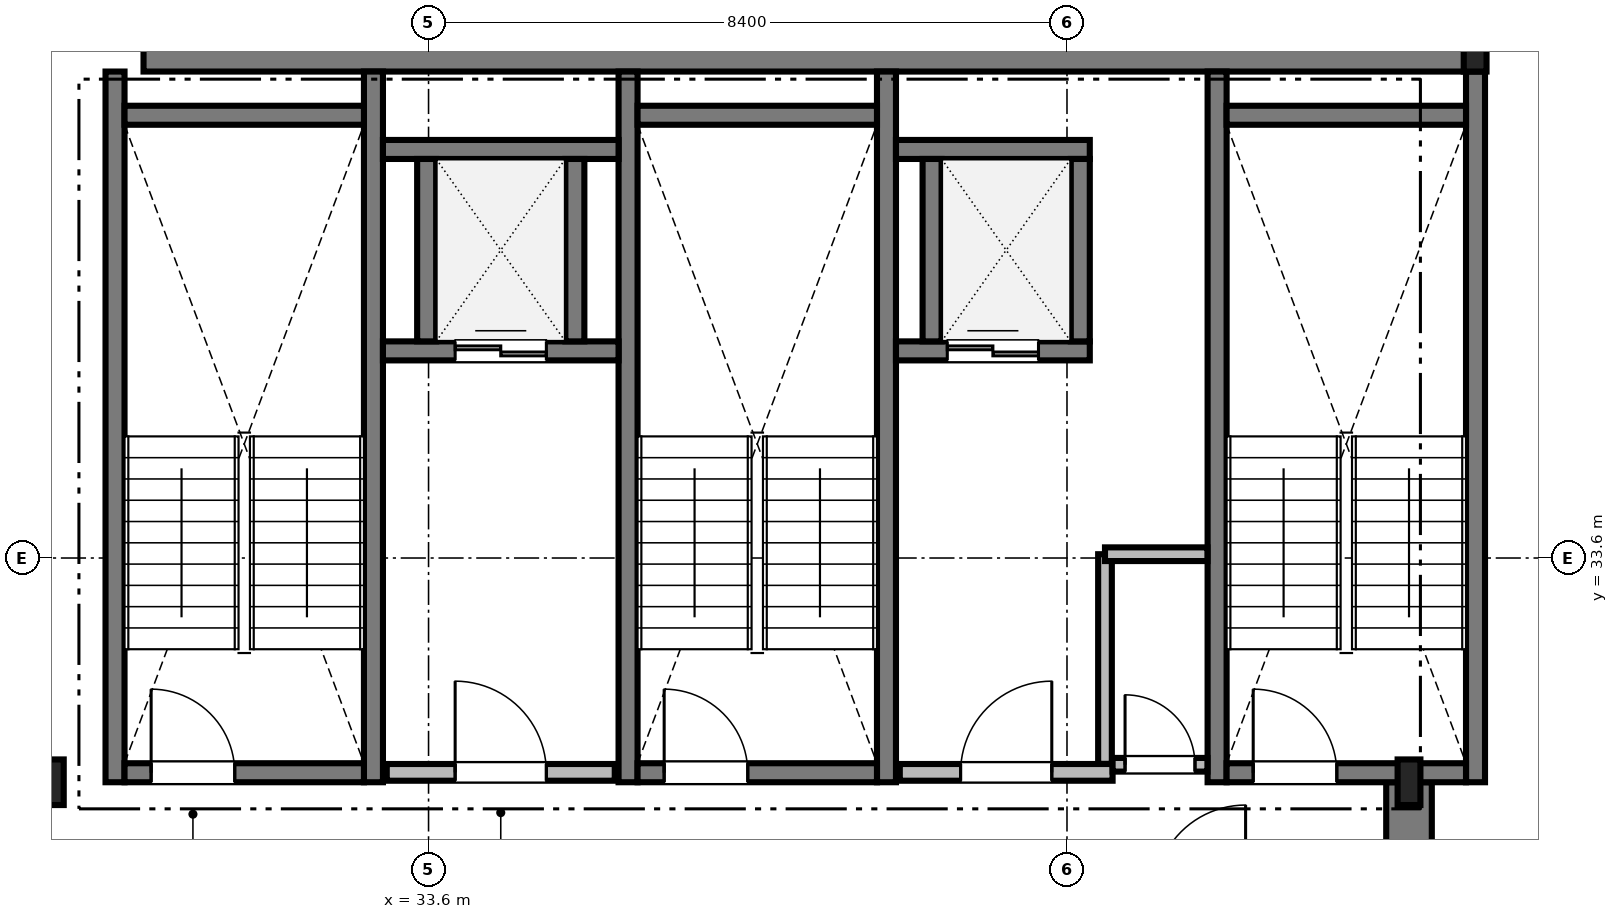
"""IFC4 building model, lengths in metres.
Left out: names, types, materials, properties, quantities, classifications, styles, units other than length and angle.
Written with IfcOpenShell. Run it as: python <this file> out.ifc"""

import sys

from ifc_helpers import new_model, si_unit, direction, frame, frame_2d, origin, origin_2d, place, context, subcontext, project, spatial, rectangle, i_section, extrude, source, transform, mapped, element, fill, save


model = new_model("IFC4")
c1 = context("Model", 3, precision=1e-05, world=origin(), true_north=direction((0.0, 1.0)))
c2 = subcontext(c1, "Body", "Model", "MODEL_VIEW")
j1 = project(units=[si_unit("LENGTHUNIT", "METRE"), si_unit("PLANEANGLEUNIT", "RADIAN")], contexts=[c1])
p1 = place(None, origin())
s1 = spatial("IfcSite", under=j1, at=p1, CompositionType="ELEMENT")
p2 = place(p1, origin())
s2 = spatial("IfcBuilding", under=s1, at=p2, CompositionType="ELEMENT")
p3 = place(p2, frame((0.0, 0.0, 270.35)))
s3 = spatial("IfcBuildingStorey", under=s2, at=p3, CompositionType="ELEMENT", Elevation=270.35)
m1 = source(origin(), c2, "Body", "SweptSolid", [
    extrude(rectangle(XDim=17.52, YDim=0.6, at=frame_2d((8.76, 0.0))), origin(), (0.0, 0.0, 1.0), 3.65),
])
p4 = place(p3, frame((29.85, 40.3, 0.0), z_axis=(0.0, 0.0, 1.0), x_axis=(1.0, 0.0, 0.0)))
e1 = element("IfcWall", 1, at=p4, inside=s3, PredefinedType="SHEAR", context=c2, shape_type="MappedRepresentation", body=[
    mapped(m1, transform((0.0, 0.0, 0.0), scale=1.0)),
])
m2 = source(origin(), c2, "Body", "SweptSolid", [
    extrude(rectangle(XDim=13.15, YDim=0.6, at=frame_2d((6.575, 0.0))), origin(), (0.0, 0.0, 1.0), 3.65),
])
p5 = place(p3, frame((46.5, 17.5, 0.0), z_axis=(0.0, 0.0, 1.0), x_axis=(0.0, 1.0, 0.0)))
e2 = element("IfcWall", 2, at=p5, inside=s3, PredefinedType="SHEAR", context=c2, shape_type="MappedRepresentation", body=[
    mapped(m2, transform((0.0, 0.0, 0.0), scale=1.0)),
])
m3 = source(origin(), c2, "Body", "SweptSolid", [
    extrude(i_section(OverallWidth=0.3, OverallDepth=0.6, WebThickness=0.015, FlangeThickness=0.03, FilletRadius=0.027, at=origin_2d()), origin(), (0.0, 0.0, 1.0), 3.65),
])
for number, where, z_axis, x_axis in (
    (3, (28.65, 30.65, 0.0), (0.0, 0.0, 1.0), (1.0, 0.0, 0.0)),
    (4, (46.5, 30.65, 0.0), (0.0, 0.0, 1.0), (1.0, 0.0, 0.0)),
    (5, (47.37, 40.3, 0.0), (0.0, 0.0, 1.0), (1.0, 0.0, 0.0)),
):
    element("IfcColumn", number, at=place(p3, frame(where, z_axis=z_axis, x_axis=x_axis)), inside=s3, PredefinedType="COLUMN", context=c2, shape_type="MappedRepresentation", body=[
        mapped(m3, transform((0.0, 0.0, 0.0), scale=1.0)),
    ])
m4 = source(origin(), c2, "Body", "SweptSolid", [
    extrude(rectangle(XDim=9.35, YDim=0.25, at=frame_2d((4.675, 0.0))), origin(), (0.0, 0.0, 1.0), 3.75),
])
for number, where, z_axis, x_axis in (
    (6, (29.475, 30.65, 0.0), (0.0, 0.0, 1.0), (0.0, 1.0, 0.0)),
    (7, (32.875, 30.65, 0.0), (0.0, 0.0, 1.0), (0.0, 1.0, 0.0)),
):
    element("IfcWall", number, at=place(p3, frame(where, z_axis=z_axis, x_axis=x_axis)), inside=s3, PredefinedType="SOLIDWALL", context=c2, shape_type="MappedRepresentation", body=[
        mapped(m4, transform((0.0, 0.0, 0.0), scale=1.0)),
    ])
m5 = source(origin(), c2, "Body", "SweptSolid", [
    extrude(rectangle(XDim=3.15, YDim=0.25, at=frame_2d((1.575, 0.0))), origin(), (0.0, 0.0, 1.0), 3.75),
])
p6 = place(p3, frame((29.6, 39.425, 0.0), z_axis=(0.0, 0.0, 1.0), x_axis=(1.0, 0.0, 0.0)))
e8 = element("IfcWall", 8, at=p6, inside=s3, PredefinedType="SOLIDWALL", context=c2, shape_type="MappedRepresentation", body=[
    mapped(m5, transform((0.0, 0.0, 0.0), scale=1.0)),
])
p7 = place(p3, frame((29.6, 30.775, 0.0), z_axis=(0.0, 0.0, 1.0), x_axis=(1.0, 0.0, 0.0)))
e9 = element("IfcWall", 9, at=p7, inside=s3, PredefinedType="SOLIDWALL", context=c2, shape_type="MappedRepresentation", body=[
    mapped(m5, transform((0.0, 0.0, 0.0), scale=1.0)),
])
m6 = source(origin(), c2, "Body", "SweptSolid", [
    extrude(rectangle(XDim=1.1, YDim=2.2, at=frame_2d((0.55, 1.1))), frame((0.0, 0.135, 0.0), z_axis=(0.0, -1.0, 0.0), x_axis=(1.0, 0.0, 0.0)), (0.0, 0.0, 1.0), 0.27),
])
p8 = place(p7, frame((0.35, 0.0, 0.0)))
e10 = element("IfcOpeningElement", 10, at=p8, cuts=e9, PredefinedType="OPENING", context=c2, shape_type="MappedRepresentation", body=[
    mapped(m6, transform((0.0, 0.0, 0.0), scale=1.0)),
])
for number, where, z_axis, x_axis in (
    (11, (36.225, 30.65, 0.0), (0.0, 0.0, 1.0), (0.0, 1.0, 0.0)),
    (12, (39.625, 30.65, 0.0), (0.0, 0.0, 1.0), (0.0, 1.0, 0.0)),
):
    element("IfcWall", number, at=place(p3, frame(where, z_axis=z_axis, x_axis=x_axis)), inside=s3, PredefinedType="SOLIDWALL", context=c2, shape_type="MappedRepresentation", body=[
        mapped(m4, transform((0.0, 0.0, 0.0), scale=1.0)),
    ])
p9 = place(p3, frame((36.35, 39.425, 0.0), z_axis=(0.0, 0.0, 1.0), x_axis=(1.0, 0.0, 0.0)))
e13 = element("IfcWall", 13, at=p9, inside=s3, PredefinedType="SOLIDWALL", context=c2, shape_type="MappedRepresentation", body=[
    mapped(m5, transform((0.0, 0.0, 0.0), scale=1.0)),
])
p10 = place(p3, frame((36.35, 30.775, 0.0), z_axis=(0.0, 0.0, 1.0), x_axis=(1.0, 0.0, 0.0)))
e14 = element("IfcWall", 14, at=p10, inside=s3, PredefinedType="SOLIDWALL", context=c2, shape_type="MappedRepresentation", body=[
    mapped(m5, transform((0.0, 0.0, 0.0), scale=1.0)),
])
p11 = place(p10, frame((0.35, 0.0, 0.0)))
e15 = element("IfcOpeningElement", 15, at=p11, cuts=e14, PredefinedType="OPENING", context=c2, shape_type="MappedRepresentation", body=[
    mapped(m6, transform((0.0, 0.0, 0.0), scale=1.0)),
])
for number, where, z_axis, x_axis in (
    (16, (43.975, 30.65, 0.0), (0.0, 0.0, 1.0), (0.0, 1.0, 0.0)),
    (17, (47.375, 30.65, 0.0), (0.0, 0.0, 1.0), (0.0, 1.0, 0.0)),
):
    element("IfcWall", number, at=place(p3, frame(where, z_axis=z_axis, x_axis=x_axis)), inside=s3, PredefinedType="SOLIDWALL", context=c2, shape_type="MappedRepresentation", body=[
        mapped(m4, transform((0.0, 0.0, 0.0), scale=1.0)),
    ])
p12 = place(p3, frame((44.1, 39.425, 0.0), z_axis=(0.0, 0.0, 1.0), x_axis=(1.0, 0.0, 0.0)))
e18 = element("IfcWall", 18, at=p12, inside=s3, PredefinedType="SOLIDWALL", context=c2, shape_type="MappedRepresentation", body=[
    mapped(m5, transform((0.0, 0.0, 0.0), scale=1.0)),
])
p13 = place(p3, frame((44.1, 30.775, 0.0), z_axis=(0.0, 0.0, 1.0), x_axis=(1.0, 0.0, 0.0)))
e19 = element("IfcWall", 19, at=p13, inside=s3, PredefinedType="SOLIDWALL", context=c2, shape_type="MappedRepresentation", body=[
    mapped(m5, transform((0.0, 0.0, 0.0), scale=1.0)),
])
p14 = place(p13, frame((0.35, 0.0, 0.0)))
e20 = element("IfcOpeningElement", 20, at=p14, cuts=e19, PredefinedType="OPENING", context=c2, shape_type="MappedRepresentation", body=[
    mapped(m6, transform((0.0, 0.0, 0.0), scale=1.0)),
])
m7 = source(origin(), c2, "Body", "SweptSolid", [
    extrude(rectangle(XDim=3.0, YDim=0.22, at=frame_2d((1.5, 0.0))), origin(), (0.0, 0.0, 1.0), 3.65),
])
p15 = place(p3, frame((33.05, 30.78, 0.0), z_axis=(0.0, 0.0, 1.0), x_axis=(1.0, 0.0, 0.0)))
e21 = element("IfcWall", 21, at=p15, inside=s3, PredefinedType="SOLIDWALL", context=c2, shape_type="MappedRepresentation", body=[
    mapped(m7, transform((0.0, 0.0, 0.0), scale=1.0)),
])
m8 = source(origin(), c2, "Body", "SweptSolid", [
    extrude(rectangle(XDim=1.2, YDim=2.2, at=frame_2d((0.6, 1.1))), frame((0.0, 0.12, 0.0), z_axis=(0.0, -1.0, 0.0), x_axis=(1.0, 0.0, 0.0)), (0.0, 0.0, 1.0), 0.24),
])
p16 = place(p15, frame((0.9, 0.0, 0.0)))
e22 = element("IfcOpeningElement", 22, at=p16, cuts=e21, PredefinedType="OPENING", context=c2, shape_type="MappedRepresentation", body=[
    mapped(m8, transform((0.0, 0.0, 0.0), scale=1.0)),
])
m9 = source(origin(), c2, "Body", "SweptSolid", [
    extrude(rectangle(XDim=2.8, YDim=0.22, at=frame_2d((1.4, 0.0))), origin(), (0.0, 0.0, 1.0), 3.65),
])
p17 = place(p3, frame((39.8, 30.78, 0.0), z_axis=(0.0, 0.0, 1.0), x_axis=(1.0, 0.0, 0.0)))
e23 = element("IfcWall", 23, at=p17, inside=s3, PredefinedType="SOLIDWALL", context=c2, shape_type="MappedRepresentation", body=[
    mapped(m9, transform((0.0, 0.0, 0.0), scale=1.0)),
])
p18 = place(p17, frame((0.8, 0.0, 0.0)))
e24 = element("IfcOpeningElement", 24, at=p18, cuts=e23, PredefinedType="OPENING", context=c2, shape_type="MappedRepresentation", body=[
    mapped(m8, transform((0.0, 0.0, 0.0), scale=1.0)),
])
m10 = source(origin(), c2, "Body", "SweptSolid", [
    extrude(rectangle(XDim=3.1, YDim=0.25, at=frame_2d((1.55, 0.0))), origin(), (0.0, 0.0, 1.0), 3.65),
])
p19 = place(p3, frame((33.0, 36.325, 0.0), z_axis=(0.0, 0.0, 1.0), x_axis=(1.0, 0.0, 0.0)))
e25 = element("IfcWall", 25, at=p19, inside=s3, PredefinedType="SOLIDWALL", context=c2, shape_type="MappedRepresentation", body=[
    mapped(m10, transform((0.0, 0.0, 0.0), scale=1.0)),
])
m11 = source(origin(), c2, "Body", "SweptSolid", [
    extrude(rectangle(XDim=1.2, YDim=2.25, at=frame_2d((0.6, 1.125))), frame((0.0, 0.135, 0.0), z_axis=(0.0, -1.0, 0.0), x_axis=(1.0, 0.0, 0.0)), (0.0, 0.0, 1.0), 0.27),
])
p20 = place(p19, frame((0.95, 0.0, 0.0)))
e26 = element("IfcOpeningElement", 26, at=p20, cuts=e25, PredefinedType="OPENING", context=c2, shape_type="MappedRepresentation", body=[
    mapped(m11, transform((0.0, 0.0, 0.0), scale=1.0)),
])
p21 = place(p3, frame((33.0, 38.975, 0.0), z_axis=(0.0, 0.0, 1.0), x_axis=(1.0, 0.0, 0.0)))
e27 = element("IfcWall", 27, at=p21, inside=s3, PredefinedType="SOLIDWALL", context=c2, shape_type="MappedRepresentation", body=[
    mapped(m10, transform((0.0, 0.0, 0.0), scale=1.0)),
])
m12 = source(origin(), c2, "Body", "SweptSolid", [
    extrude(rectangle(XDim=2.4, YDim=0.25, at=frame_2d((1.2, 0.0))), origin(), (0.0, 0.0, 1.0), 3.65),
])
for number, where, z_axis, x_axis in (
    (28, (33.575, 36.45, 0.0), (0.0, 0.0, 1.0), (0.0, 1.0, 0.0)),
    (29, (35.525, 36.45, 0.0), (0.0, 0.0, 1.0), (0.0, 1.0, 0.0)),
):
    element("IfcWall", number, at=place(p3, frame(where, z_axis=z_axis, x_axis=x_axis)), inside=s3, PredefinedType="SOLIDWALL", context=c2, shape_type="MappedRepresentation", body=[
        mapped(m12, transform((0.0, 0.0, 0.0), scale=1.0)),
    ])
m13 = source(origin(), c2, "Body", "SweptSolid", [
    extrude(rectangle(XDim=2.55, YDim=0.25, at=frame_2d((1.275, 0.0))), origin(), (0.0, 0.0, 1.0), 3.65),
])
p22 = place(p3, frame((39.75, 36.325, 0.0), z_axis=(0.0, 0.0, 1.0), x_axis=(1.0, 0.0, 0.0)))
e30 = element("IfcWall", 30, at=p22, inside=s3, PredefinedType="SOLIDWALL", context=c2, shape_type="MappedRepresentation", body=[
    mapped(m13, transform((0.0, 0.0, 0.0), scale=1.0)),
])
p23 = place(p22, frame((0.675, 0.0, 0.0)))
e31 = element("IfcOpeningElement", 31, at=p23, cuts=e30, PredefinedType="OPENING", context=c2, shape_type="MappedRepresentation", body=[
    mapped(m11, transform((0.0, 0.0, 0.0), scale=1.0)),
])
p24 = place(p3, frame((39.75, 38.975, 0.0), z_axis=(0.0, 0.0, 1.0), x_axis=(1.0, 0.0, 0.0)))
e32 = element("IfcWall", 32, at=p24, inside=s3, PredefinedType="SOLIDWALL", context=c2, shape_type="MappedRepresentation", body=[
    mapped(m13, transform((0.0, 0.0, 0.0), scale=1.0)),
])
for number, where, z_axis, x_axis in (
    (33, (40.225, 36.45, 0.0), (0.0, 0.0, 1.0), (0.0, 1.0, 0.0)),
    (34, (42.175, 36.45, 0.0), (0.0, 0.0, 1.0), (0.0, 1.0, 0.0)),
):
    element("IfcWall", number, at=place(p3, frame(where, z_axis=z_axis, x_axis=x_axis)), inside=s3, PredefinedType="SOLIDWALL", context=c2, shape_type="MappedRepresentation", body=[
        mapped(m12, transform((0.0, 0.0, 0.0), scale=1.0)),
    ])
m14 = source(origin(), c2, "Body", "SweptSolid", [
    extrude(rectangle(XDim=1.248, YDim=0.18, at=frame_2d((0.624, 0.0))), origin(), (0.0, 0.0, 1.0), 3.65),
])
p25 = place(p3, frame((42.6, 30.88, 0.0), z_axis=(0.0, 0.0, 1.0), x_axis=(1.0, 0.0, 0.0)))
e35 = element("IfcWall", 35, at=p25, inside=s3, PredefinedType="PARTITIONING", context=c2, shape_type="MappedRepresentation", body=[
    mapped(m14, transform((0.0, 0.0, 0.0), scale=1.0)),
])
m15 = source(origin(), c2, "Body", "SweptSolid", [
    extrude(rectangle(XDim=0.92, YDim=2.1, at=frame_2d((0.46, 1.05))), frame((0.0, 0.1, 0.0), z_axis=(0.0, -1.0, 0.0), x_axis=(1.0, 0.0, 0.0)), (0.0, 0.0, 1.0), 0.2),
])
p26 = place(p25, frame((0.164, 0.0, 0.0)))
e36 = element("IfcOpeningElement", 36, at=p26, cuts=e35, PredefinedType="OPENING", context=c2, shape_type="MappedRepresentation", body=[
    mapped(m15, transform((0.0, 0.0, 0.0), scale=1.0)),
])
m16 = source(origin(), c2, "Body", "SweptSolid", [
    extrude(rectangle(XDim=2.758, YDim=0.18, at=frame_2d((1.379, 0.0))), origin(), (0.0, 0.0, 1.0), 3.65),
])
p27 = place(p3, frame((42.5, 30.892, 0.0), z_axis=(0.0, 0.0, 1.0), x_axis=(0.0, 1.0, 0.0)))
e37 = element("IfcWall", 37, at=p27, inside=s3, PredefinedType="PARTITIONING", context=c2, shape_type="MappedRepresentation", body=[
    mapped(m16, transform((0.0, 0.0, 0.0), scale=1.0)),
])
m17 = source(origin(), c2, "Body", "SweptSolid", [
    extrude(rectangle(XDim=1.348, YDim=0.18, at=frame_2d((0.674, 0.0))), origin(), (0.0, 0.0, 1.0), 3.65),
])
p28 = place(p3, frame((42.5, 33.65, 0.0), z_axis=(0.0, 0.0, 1.0), x_axis=(1.0, 0.0, 0.0)))
e38 = element("IfcWall", 38, at=p28, inside=s3, PredefinedType="PARTITIONING", context=c2, shape_type="MappedRepresentation", body=[
    mapped(m17, transform((0.0, 0.0, 0.0), scale=1.0)),
])
m18 = source(origin(), c2, "Body", "SweptSolid", [
    extrude(rectangle(XDim=1.1, YDim=2.2, at=frame_2d((0.55, 1.1))), frame((0.0, 0.025, 0.0), z_axis=(0.0, -1.0, 0.0), x_axis=(1.0, 0.0, 0.0)), (0.0, 0.0, 1.0), 0.05),
])
p29 = place(p8, origin())
e39 = element("IfcDoor", 39, at=p29, inside=s3, OperationType="SINGLE_SWING_LEFT", PredefinedType="DOOR", context=c2, shape_type="MappedRepresentation", body=[
    mapped(m18, transform((0.0, 0.0, 0.0), scale=1.0)),
])
fill(e10, e39)
p30 = place(p11, origin())
e40 = element("IfcDoor", 40, at=p30, inside=s3, OperationType="SINGLE_SWING_LEFT", PredefinedType="DOOR", context=c2, shape_type="MappedRepresentation", body=[
    mapped(m18, transform((0.0, 0.0, 0.0), scale=1.0)),
])
fill(e15, e40)
p31 = place(p14, origin())
e41 = element("IfcDoor", 41, at=p31, inside=s3, OperationType="SINGLE_SWING_LEFT", PredefinedType="DOOR", context=c2, shape_type="MappedRepresentation", body=[
    mapped(m18, transform((0.0, 0.0, 0.0), scale=1.0)),
])
fill(e20, e41)
m19 = source(origin(), c2, "Body", "SweptSolid", [
    extrude(rectangle(XDim=1.2, YDim=2.2, at=frame_2d((0.6, 1.1))), frame((0.0, 0.025, 0.0), z_axis=(0.0, -1.0, 0.0), x_axis=(1.0, 0.0, 0.0)), (0.0, 0.0, 1.0), 0.05),
])
p32 = place(p16, origin())
e42 = element("IfcDoor", 42, at=p32, inside=s3, OperationType="SINGLE_SWING_LEFT", PredefinedType="DOOR", context=c2, shape_type="MappedRepresentation", body=[
    mapped(m19, transform((0.0, 0.0, 0.0), scale=1.0)),
])
fill(e22, e42)
p33 = place(p18, origin())
e43 = element("IfcDoor", 43, at=p33, inside=s3, OperationType="SINGLE_SWING_RIGHT", PredefinedType="DOOR", context=c2, shape_type="MappedRepresentation", body=[
    mapped(m19, transform((0.0, 0.0, 0.0), scale=1.0)),
])
fill(e24, e43)
m20 = source(origin(), c2, "Body", "SweptSolid", [
    extrude(rectangle(XDim=1.2, YDim=2.25, at=frame_2d((0.6, 1.125))), frame((0.0, 0.025, 0.0), z_axis=(0.0, -1.0, 0.0), x_axis=(1.0, 0.0, 0.0)), (0.0, 0.0, 1.0), 0.05),
])
p34 = place(p20, origin())
e44 = element("IfcDoor", 44, at=p34, inside=s3, OperationType="DOUBLE_DOOR_SLIDING", PredefinedType="DOOR", context=c2, shape_type="MappedRepresentation", body=[
    mapped(m20, transform((0.0, 0.0, 0.0), scale=1.0)),
])
fill(e26, e44)
p35 = place(p23, origin())
e45 = element("IfcDoor", 45, at=p35, inside=s3, OperationType="DOUBLE_DOOR_SLIDING", PredefinedType="DOOR", context=c2, shape_type="MappedRepresentation", body=[
    mapped(m20, transform((0.0, 0.0, 0.0), scale=1.0)),
])
fill(e31, e45)
m21 = source(origin(), c2, "Body", "SweptSolid", [
    extrude(rectangle(XDim=0.92, YDim=2.1, at=frame_2d((0.46, 1.05))), frame((0.0, 0.025, 0.0), z_axis=(0.0, -1.0, 0.0), x_axis=(1.0, 0.0, 0.0)), (0.0, 0.0, 1.0), 0.05),
])
p36 = place(p26, origin())
e46 = element("IfcDoor", 46, at=p36, inside=s3, OperationType="SINGLE_SWING_LEFT", PredefinedType="DOOR", context=c2, shape_type="MappedRepresentation", body=[
    mapped(m21, transform((0.0, 0.0, 0.0), scale=1.0)),
])
fill(e36, e46)
save(model, sys.argv[1])
